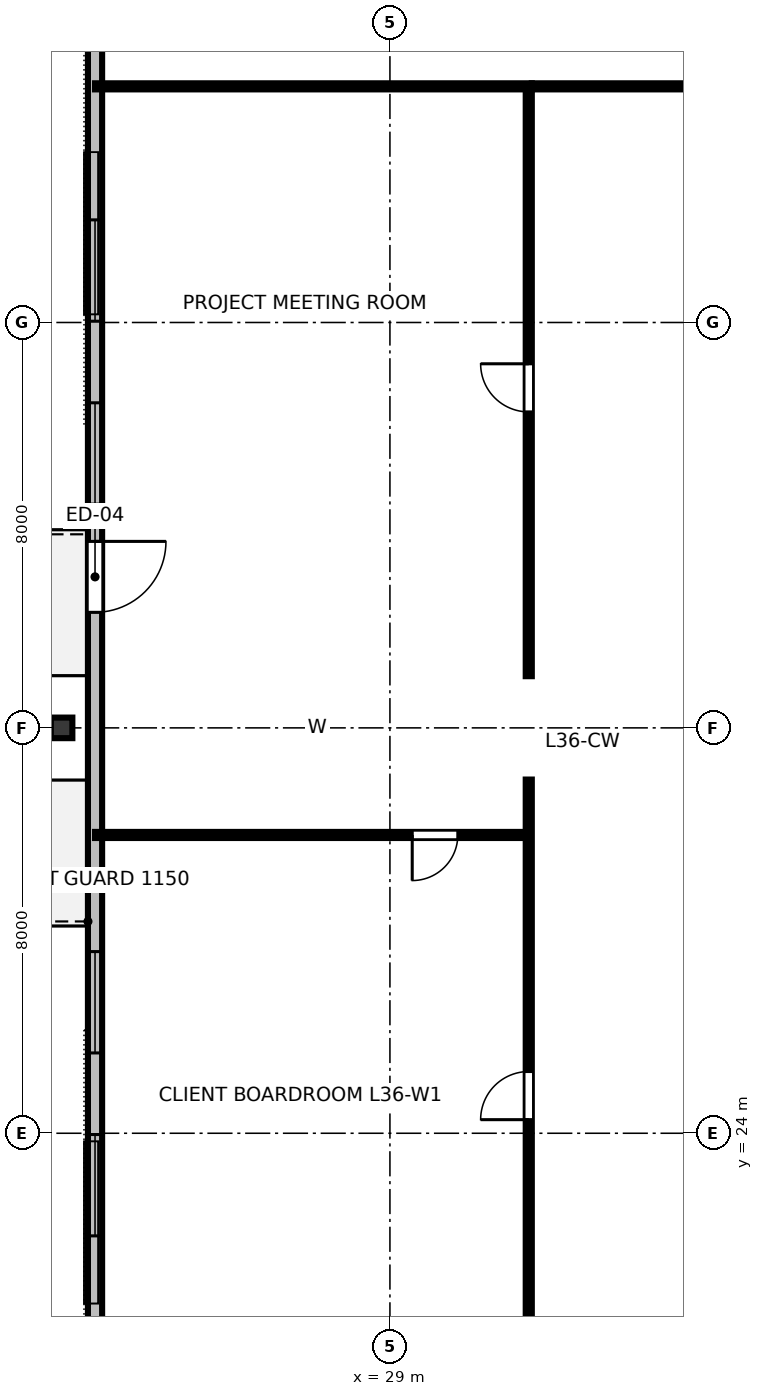
"""IFC4 building model, lengths in metres.
Left out: names, types, materials, properties, quantities, classifications, styles, units other than length and angle.
Written with IfcOpenShell. Run it as: python <this file> out.ifc"""

import sys

from ifc_helpers import new_model, si_unit, direction, frame, frame_2d, origin, origin_2d, place, context, subcontext, project, spatial, rectangle, i_section, extrude, element, fill, save


model = new_model("IFC4")
c1 = context("Model", 3, precision=1e-05, world=origin(), true_north=direction((0.0, 1.0)))
c2 = subcontext(c1, "Body", "Model", "MODEL_VIEW")
j1 = project(units=[si_unit("LENGTHUNIT", "METRE"), si_unit("PLANEANGLEUNIT", "RADIAN")], contexts=[c1])
p1 = place(None, origin())
s1 = spatial("IfcSite", under=j1, at=p1, CompositionType="ELEMENT")
p2 = place(p1, origin())
s2 = spatial("IfcBuilding", under=s1, at=p2, CompositionType="ELEMENT")
p3 = place(p2, frame((0.0, 0.0, 138.4)))
s3 = spatial("IfcBuildingStorey", under=s2, at=p3, CompositionType="ELEMENT", Elevation=138.4)
p4 = place(p3, frame((22.52, 32.0, 0.0), z_axis=(0.0, 0.0, 1.0), x_axis=(0.0, 1.0, 0.0)))
e1 = element("IfcColumn", 1, at=p4, inside=s3, PredefinedType="COLUMN", context=c2, shape_type="SweptSolid", body=[
    extrude(i_section(OverallWidth=0.406, OverallDepth=0.425, WebThickness=0.033, FlangeThickness=0.052, FilletRadius=0.025, at=origin_2d()), origin(), (0.0, 0.0, 1.0), 3.358),
])
p5 = place(p3, frame((23.18, 47.54, 0.0), z_axis=(0.0, 0.0, 1.0), x_axis=(0.0, -1.0, 0.0)))
e2 = element("IfcWall", 2, at=p5, inside=s3, PredefinedType="STANDARD", context=c2, shape_type="SweptSolid", body=[
    extrude(rectangle(XDim=31.08, YDim=0.28, at=frame_2d((15.54, 0.0))), origin(), (0.0, 0.0, 1.0), 3.36),
])
p6 = place(p5, frame((11.86, 0.0, 0.0)))
e3 = element("IfcOpeningElement", 3, at=p6, cuts=e2, PredefinedType="OPENING", context=c2, shape_type="SweptSolid", body=[
    extrude(rectangle(XDim=1.4, YDim=2.15, at=frame_2d((0.7, 1.075))), frame((0.0, 0.15, 0.0), z_axis=(0.0, -1.0, 0.0), x_axis=(1.0, 0.0, 0.0)), (0.0, 0.0, 1.0), 0.3),
])
p7 = place(p5, frame((5.515, 0.0, 0.8)))
e4 = element("IfcOpeningElement", 4, at=p7, cuts=e2, PredefinedType="OPENING", context=c2, shape_type="SweptSolid", body=[
    extrude(rectangle(XDim=2.0, YDim=1.95, at=frame_2d((1.0, 0.975))), frame((0.0, 0.15, 0.0), z_axis=(0.0, -1.0, 0.0), x_axis=(1.0, 0.0, 0.0)), (0.0, 0.0, 1.0), 0.3),
])
p8 = place(p5, frame((9.125, 0.0, 0.8)))
e5 = element("IfcOpeningElement", 5, at=p8, cuts=e2, PredefinedType="OPENING", context=c2, shape_type="SweptSolid", body=[
    extrude(rectangle(XDim=2.0, YDim=1.95, at=frame_2d((1.0, 0.975))), frame((0.0, 0.15, 0.0), z_axis=(0.0, -1.0, 0.0), x_axis=(1.0, 0.0, 0.0)), (0.0, 0.0, 1.0), 0.3),
])
p9 = place(p5, frame((19.955, 0.0, 0.8)))
e6 = element("IfcOpeningElement", 6, at=p9, cuts=e2, PredefinedType="OPENING", context=c2, shape_type="SweptSolid", body=[
    extrude(rectangle(XDim=2.0, YDim=1.95, at=frame_2d((1.0, 0.975))), frame((0.0, 0.15, 0.0), z_axis=(0.0, -1.0, 0.0), x_axis=(1.0, 0.0, 0.0)), (0.0, 0.0, 1.0), 0.3),
])
p10 = place(p5, frame((23.565, 0.0, 0.8)))
e7 = element("IfcOpeningElement", 7, at=p10, cuts=e2, PredefinedType="OPENING", context=c2, shape_type="SweptSolid", body=[
    extrude(rectangle(XDim=2.0, YDim=1.95, at=frame_2d((1.0, 0.975))), frame((0.0, 0.15, 0.0), z_axis=(0.0, -1.0, 0.0), x_axis=(1.0, 0.0, 0.0)), (0.0, 0.0, 1.0), 0.3),
])
p11 = place(p3, frame((31.8, 44.66, 0.0), z_axis=(0.0, 0.0, 1.0), x_axis=(1.0, 0.0, 0.0)))
e8 = element("IfcWall", 8, at=p11, inside=s3, PredefinedType="PARTITIONING", context=c2, shape_type="SweptSolid", body=[
    extrude(rectangle(XDim=28.4, YDim=0.12, at=frame_2d((14.2, 0.0))), origin(), (0.0, 0.0, 1.0), 2.64),
])
p12 = place(p11, frame((3.705, 0.0, 0.0)))
e9 = element("IfcOpeningElement", 9, at=p12, cuts=e8, PredefinedType="OPENING", context=c2, shape_type="SweptSolid", body=[
    extrude(rectangle(XDim=0.95, YDim=2.15, at=frame_2d((0.475, 1.075))), frame((0.0, 0.07, 0.0), z_axis=(0.0, -1.0, 0.0), x_axis=(1.0, 0.0, 0.0)), (0.0, 0.0, 1.0), 0.14),
])
p13 = place(p11, frame((11.836, 0.0, 0.0)))
e10 = element("IfcOpeningElement", 10, at=p13, cuts=e8, PredefinedType="OPENING", context=c2, shape_type="SweptSolid", body=[
    extrude(rectangle(XDim=0.95, YDim=2.15, at=frame_2d((0.475, 1.075))), frame((0.0, 0.07, 0.0), z_axis=(0.0, -1.0, 0.0), x_axis=(1.0, 0.0, 0.0)), (0.0, 0.0, 1.0), 0.14),
])
p14 = place(p11, frame((21.856, 0.0, 0.0)))
e11 = element("IfcOpeningElement", 11, at=p14, cuts=e8, PredefinedType="OPENING", context=c2, shape_type="SweptSolid", body=[
    extrude(rectangle(XDim=0.95, YDim=2.15, at=frame_2d((0.475, 1.075))), frame((0.0, 0.07, 0.0), z_axis=(0.0, -1.0, 0.0), x_axis=(1.0, 0.0, 0.0)), (0.0, 0.0, 1.0), 0.14),
])
p15 = place(p3, frame((31.74, 29.887, 0.0), z_axis=(0.0, 0.0, 1.0), x_axis=(-1.0, 0.0, 0.0)))
e12 = element("IfcWall", 12, at=p15, inside=s3, PredefinedType="PARTITIONING", context=c2, shape_type="SweptSolid", body=[
    extrude(rectangle(XDim=8.56, YDim=0.12, at=frame_2d((4.28, 0.0))), origin(), (0.0, 0.0, 1.0), 2.64),
])
p16 = place(p15, frame((1.4, 0.0, 0.0)))
e13 = element("IfcOpeningElement", 13, at=p16, cuts=e12, PredefinedType="OPENING", context=c2, shape_type="SweptSolid", body=[
    extrude(rectangle(XDim=0.9, YDim=2.15, at=frame_2d((0.45, 1.075))), frame((0.0, 0.07, 0.0), z_axis=(0.0, -1.0, 0.0), x_axis=(1.0, 0.0, 0.0)), (0.0, 0.0, 1.0), 0.14),
])
p17 = place(p3, frame((31.74, 19.4, 0.0), z_axis=(0.0, 0.0, 1.0), x_axis=(0.0, 1.0, 0.0)))
e14 = element("IfcWall", 14, at=p17, inside=s3, PredefinedType="PARTITIONING", context=c2, shape_type="SweptSolid", body=[
    extrude(rectangle(XDim=11.58, YDim=0.12, at=frame_2d((5.79, 0.0))), origin(), (0.0, 0.0, 1.0), 2.64),
])
p18 = place(p17, frame((4.868, 0.0, 0.0)))
e15 = element("IfcOpeningElement", 15, at=p18, cuts=e14, PredefinedType="OPENING", context=c2, shape_type="SweptSolid", body=[
    extrude(rectangle(XDim=0.95, YDim=2.15, at=frame_2d((0.475, 1.075))), frame((0.0, 0.07, 0.0), z_axis=(0.0, -1.0, 0.0), x_axis=(1.0, 0.0, 0.0)), (0.0, 0.0, 1.0), 0.14),
])
p19 = place(p3, frame((31.74, 33.02, 0.0), z_axis=(0.0, 0.0, 1.0), x_axis=(0.0, 1.0, 0.0)))
e16 = element("IfcWall", 16, at=p19, inside=s3, PredefinedType="PARTITIONING", context=c2, shape_type="SweptSolid", body=[
    extrude(rectangle(XDim=11.58, YDim=0.12, at=frame_2d((5.79, 0.0))), origin(), (0.0, 0.0, 1.0), 2.64),
])
p20 = place(p19, frame((5.215, 0.0, 0.0)))
e17 = element("IfcOpeningElement", 17, at=p20, cuts=e16, PredefinedType="OPENING", context=c2, shape_type="SweptSolid", body=[
    extrude(rectangle(XDim=0.95, YDim=2.15, at=frame_2d((0.475, 1.075))), frame((0.0, 0.07, 0.0), z_axis=(0.0, -1.0, 0.0), x_axis=(1.0, 0.0, 0.0)), (0.0, 0.0, 1.0), 0.14),
])
p21 = place(p3, frame((31.8, 44.66, 0.0), z_axis=(0.0, 0.0, 1.0), x_axis=(-1.0, 0.0, 0.0)))
e18 = element("IfcWall", 18, at=p21, inside=s3, PredefinedType="PARTITIONING", context=c2, shape_type="SweptSolid", body=[
    extrude(rectangle(XDim=8.62, YDim=0.12, at=frame_2d((4.31, 0.0))), origin(), (0.0, 0.0, 1.0), 2.64),
])
p22 = place(p6, origin())
e19 = element("IfcDoor", 19, at=p22, inside=s3, OperationType="SINGLE_SWING_LEFT", PredefinedType="DOOR", context=c2, shape_type="SweptSolid", body=[
    extrude(rectangle(XDim=1.4, YDim=2.15, at=frame_2d((0.7, 1.075))), frame((0.0, 0.025, 0.0), z_axis=(0.0, -1.0, 0.0), x_axis=(1.0, 0.0, 0.0)), (0.0, 0.0, 1.0), 0.05),
])
fill(e3, e19)
p23 = place(p7, origin())
e20 = element("IfcWindow", 20, at=p23, inside=s3, PartitioningType="SINGLE_PANEL", PredefinedType="WINDOW", context=c2, shape_type="SweptSolid", body=[
    extrude(rectangle(XDim=2.0, YDim=1.95, at=frame_2d((1.0, 0.975))), frame((0.0, 0.03, 0.0), z_axis=(0.0, -1.0, 0.0), x_axis=(1.0, 0.0, 0.0)), (0.0, 0.0, 1.0), 0.06),
])
fill(e4, e20)
p24 = place(p8, origin())
e21 = element("IfcWindow", 21, at=p24, inside=s3, PartitioningType="SINGLE_PANEL", PredefinedType="WINDOW", context=c2, shape_type="SweptSolid", body=[
    extrude(rectangle(XDim=2.0, YDim=1.95, at=frame_2d((1.0, 0.975))), frame((0.0, 0.03, 0.0), z_axis=(0.0, -1.0, 0.0), x_axis=(1.0, 0.0, 0.0)), (0.0, 0.0, 1.0), 0.06),
])
fill(e5, e21)
p25 = place(p9, origin())
e22 = element("IfcWindow", 22, at=p25, inside=s3, PartitioningType="SINGLE_PANEL", PredefinedType="WINDOW", context=c2, shape_type="SweptSolid", body=[
    extrude(rectangle(XDim=2.0, YDim=1.95, at=frame_2d((1.0, 0.975))), frame((0.0, 0.03, 0.0), z_axis=(0.0, -1.0, 0.0), x_axis=(1.0, 0.0, 0.0)), (0.0, 0.0, 1.0), 0.06),
])
fill(e6, e22)
p26 = place(p10, origin())
e23 = element("IfcWindow", 23, at=p26, inside=s3, PartitioningType="SINGLE_PANEL", PredefinedType="WINDOW", context=c2, shape_type="SweptSolid", body=[
    extrude(rectangle(XDim=2.0, YDim=1.95, at=frame_2d((1.0, 0.975))), frame((0.0, 0.03, 0.0), z_axis=(0.0, -1.0, 0.0), x_axis=(1.0, 0.0, 0.0)), (0.0, 0.0, 1.0), 0.06),
])
fill(e7, e23)
p27 = place(p16, origin())
e24 = element("IfcDoor", 24, at=p27, inside=s3, OperationType="SINGLE_SWING_RIGHT", PredefinedType="DOOR", context=c2, shape_type="SweptSolid", body=[
    extrude(rectangle(XDim=0.9, YDim=2.15, at=frame_2d((0.45, 1.075))), frame((0.0, 0.025, 0.0), z_axis=(0.0, -1.0, 0.0), x_axis=(1.0, 0.0, 0.0)), (0.0, 0.0, 1.0), 0.05),
])
fill(e13, e24)
p28 = place(p18, origin())
e25 = element("IfcDoor", 25, at=p28, inside=s3, OperationType="SINGLE_SWING_LEFT", PredefinedType="DOOR", context=c2, shape_type="SweptSolid", body=[
    extrude(rectangle(XDim=0.95, YDim=2.15, at=frame_2d((0.475, 1.075))), frame((0.0, 0.025, 0.0), z_axis=(0.0, -1.0, 0.0), x_axis=(1.0, 0.0, 0.0)), (0.0, 0.0, 1.0), 0.05),
])
fill(e15, e25)
p29 = place(p20, origin())
e26 = element("IfcDoor", 26, at=p29, inside=s3, OperationType="SINGLE_SWING_RIGHT", PredefinedType="DOOR", context=c2, shape_type="SweptSolid", body=[
    extrude(rectangle(XDim=0.95, YDim=2.15, at=frame_2d((0.475, 1.075))), frame((0.0, 0.025, 0.0), z_axis=(0.0, -1.0, 0.0), x_axis=(1.0, 0.0, 0.0)), (0.0, 0.0, 1.0), 0.05),
])
fill(e17, e26)
save(model, sys.argv[1])
